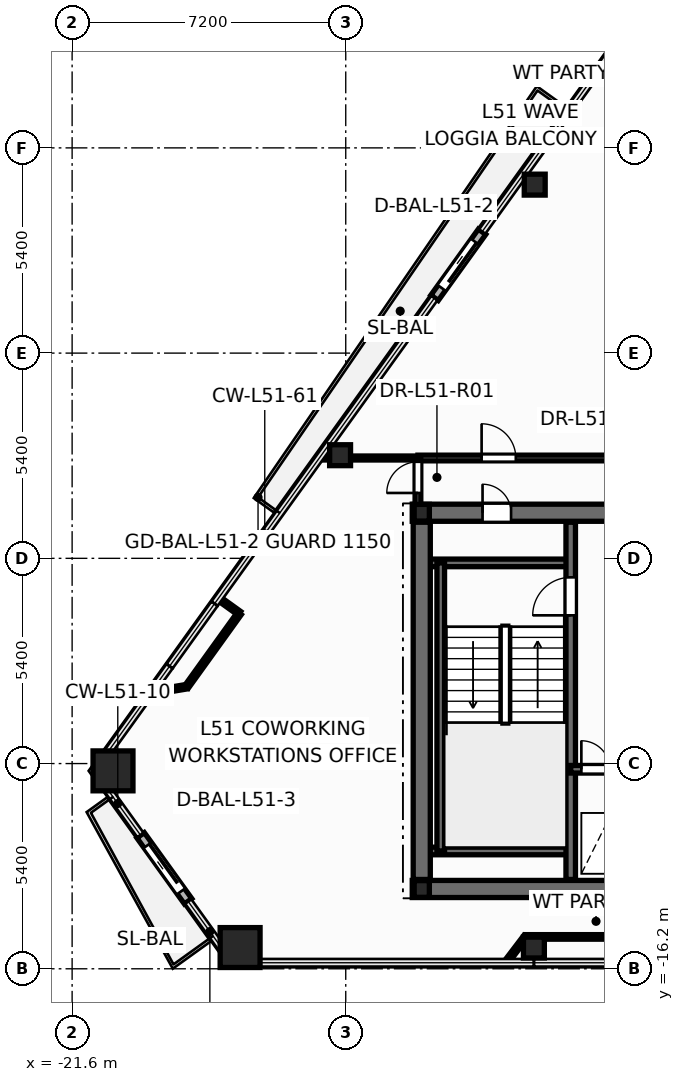
"""IFC4 building model, lengths in metres.
Left out: names, types, materials, properties, quantities, classifications, styles, units other than length and angle.
Written with IfcOpenShell. Run it as: python <this file> out.ifc"""

import sys

from ifc_helpers import new_model, si_unit, direction, frame, frame_2d, origin, origin_2d, place, context, subcontext, project, spatial, rectangle, hollow_rectangle, hollow_circle, i_section, extrude, element, fill, save


model = new_model("IFC4")
c1 = context("Model", 3, precision=1e-05, world=origin(), true_north=direction((0.0, 1.0)))
c2 = subcontext(c1, "Body", "Model", "MODEL_VIEW")
j1 = project(units=[si_unit("LENGTHUNIT", "METRE"), si_unit("PLANEANGLEUNIT", "RADIAN")], contexts=[c1])
p1 = place(None, origin())
s1 = spatial("IfcSite", under=j1, at=p1, CompositionType="ELEMENT")
p2 = place(p1, origin())
s2 = spatial("IfcBuilding", under=s1, at=p2, CompositionType="ELEMENT")
p3 = place(p2, frame((0.0, 0.0, 196.5)))
s3 = spatial("IfcBuildingStorey", under=s2, at=p3, CompositionType="ELEMENT", Elevation=196.5)
for number, where, z_axis, x_axis in (
    (1, (-20.524, -10.992, 0.0), (0.0, 0.0, 1.0), (1.0, 0.0, 0.0)),
    (2, (-17.18, -15.641, 0.0), (0.0, 0.0, 1.0), (1.0, 0.0, 0.0)),
):
    element("IfcColumn", number, at=place(p3, frame(where, z_axis=z_axis, x_axis=x_axis)), inside=s3, PredefinedType="COLUMN", context=c2, shape_type="SweptSolid", body=[
        extrude(hollow_rectangle(XDim=1.05, YDim=1.05, WallThickness=0.045, at=origin_2d()), origin(), (0.0, 0.0, 1.0), 3.6),
    ])
for number, where, z_axis, x_axis in (
    (3, (-9.449, -15.641, 0.0), (0.0, 0.0, 1.0), (1.0, 0.0, 0.0)),
    (4, (-9.427, 4.433, 0.0), (0.0, 0.0, 1.0), (1.0, 0.0, 0.0)),
    (5, (-14.549, -2.686, 0.0), (0.0, 0.0, 1.0), (1.0, 0.0, 0.0)),
):
    element("IfcColumn", number, at=place(p3, frame(where, z_axis=z_axis, x_axis=x_axis)), inside=s3, PredefinedType="COLUMN", context=c2, shape_type="SweptSolid", body=[
        extrude(hollow_circle(Radius=0.275, WallThickness=0.024, at=origin_2d()), origin(), (0.0, 0.0, 1.0), 3.6),
    ])
for number, where, z_axis, x_axis in (
    (6, (-12.4, -14.1, 0.0), (0.0, 0.0, 1.0), (1.0, 0.0, 0.0)),
    (7, (-12.4, -4.2, 0.0), (0.0, 0.0, 1.0), (1.0, 0.0, 0.0)),
):
    element("IfcColumn", number, at=place(p3, frame(where, z_axis=z_axis, x_axis=x_axis)), inside=s3, PredefinedType="COLUMN", context=c2, shape_type="SweptSolid", body=[
        extrude(i_section(OverallWidth=0.4, OverallDepth=0.44, WebThickness=0.028, FlangeThickness=0.04, at=origin_2d()), origin(), (0.0, 0.0, 1.0), 3.6),
    ])
p4 = place(p3, frame((-10.813, 3.192, -0.015), z_axis=(0.0, 0.0, 1.0), x_axis=(-0.583965085393, -0.811778774693, 0.0)))
e8 = element("IfcWall", 8, at=p4, inside=s3, PredefinedType="STANDARD", context=c2, shape_type="SweptSolid", body=[
    extrude(rectangle(XDim=2.14, YDim=0.24, at=frame_2d((1.07, 0.0))), origin(), (0.0, 0.0, 1.0), 2.807),
])
p5 = place(p4, frame((0.32, 0.0, 0.015)))
e9 = element("IfcOpeningElement", 9, at=p5, cuts=e8, PredefinedType="OPENING", context=c2, shape_type="SweptSolid", body=[
    extrude(rectangle(XDim=1.506, YDim=2.204, at=frame_2d((0.75, 1.102))), frame((0.0, 0.13, 0.0), z_axis=(0.0, -1.0, 0.0), x_axis=(1.0, 0.0, 0.0)), (0.0, 0.0, 1.0), 0.26),
])
p6 = place(p3, frame((-19.798, -12.686, -0.015), z_axis=(0.0, 0.0, 1.0), x_axis=(0.583965085393, -0.811778774693, 0.0)))
e10 = element("IfcWall", 10, at=p6, inside=s3, PredefinedType="STANDARD", context=c2, shape_type="SweptSolid", body=[
    extrude(rectangle(XDim=2.14, YDim=0.24, at=frame_2d((1.07, 0.0))), origin(), (0.0, 0.0, 1.0), 2.807),
])
p7 = place(p6, frame((0.32, 0.0, 0.015)))
e11 = element("IfcOpeningElement", 11, at=p7, cuts=e10, PredefinedType="OPENING", context=c2, shape_type="SweptSolid", body=[
    extrude(rectangle(XDim=1.506, YDim=2.204, at=frame_2d((0.75, 1.102))), frame((0.0, 0.13, 0.0), z_axis=(0.0, -1.0, 0.0), x_axis=(1.0, 0.0, 0.0)), (0.0, 0.0, 1.0), 0.26),
])
p8 = place(p3, frame((-12.65, -14.1, 0.0), z_axis=(0.0, 0.0, 1.0), x_axis=(1.0, 0.0, 0.0)))
e12 = element("IfcWall", 12, at=p8, inside=s3, PredefinedType="SHEAR", context=c2, shape_type="SweptSolid", body=[
    extrude(rectangle(XDim=25.3, YDim=0.45, at=frame_2d((12.65, 0.0))), origin(), (0.0, 0.0, 1.0), 3.6),
])
p9 = place(p3, frame((-12.65, -4.2, 0.0), z_axis=(0.0, 0.0, 1.0), x_axis=(1.0, 0.0, 0.0)))
e13 = element("IfcWall", 13, at=p9, inside=s3, PredefinedType="SHEAR", context=c2, shape_type="SweptSolid", body=[
    extrude(rectangle(XDim=25.3, YDim=0.45, at=frame_2d((12.65, 0.0))), origin(), (0.0, 0.0, 1.0), 3.6),
])
p10 = place(p9, frame((1.85, 0.0, 0.0)))
e14 = element("IfcOpeningElement", 14, at=p10, cuts=e13, PredefinedType="OPENING", context=c2, shape_type="SweptSolid", body=[
    extrude(rectangle(XDim=0.756, YDim=2.054, at=frame_2d((0.375, 1.027))), frame((0.0, 0.235, 0.0), z_axis=(0.0, -1.0, 0.0), x_axis=(1.0, 0.0, 0.0)), (0.0, 0.0, 1.0), 0.47),
])
p11 = place(p9, frame((22.65, 0.0, 0.0)))
e15 = element("IfcOpeningElement", 15, at=p11, cuts=e13, PredefinedType="OPENING", context=c2, shape_type="SweptSolid", body=[
    extrude(rectangle(XDim=0.756, YDim=2.054, at=frame_2d((0.375, 1.027))), frame((0.0, 0.235, 0.0), z_axis=(0.0, -1.0, 0.0), x_axis=(1.0, 0.0, 0.0)), (0.0, 0.0, 1.0), 0.47),
])
p12 = place(p9, frame((5.85, 0.0, 0.0)))
e16 = element("IfcOpeningElement", 16, at=p12, cuts=e13, PredefinedType="OPENING", context=c2, shape_type="SweptSolid", body=[
    extrude(rectangle(XDim=1.006, YDim=2.104, at=frame_2d((0.5, 1.052))), frame((0.0, 0.235, 0.0), z_axis=(0.0, -1.0, 0.0), x_axis=(1.0, 0.0, 0.0)), (0.0, 0.0, 1.0), 0.47),
])
p13 = place(p9, frame((10.35, 0.0, 0.0)))
e17 = element("IfcOpeningElement", 17, at=p13, cuts=e13, PredefinedType="OPENING", context=c2, shape_type="SweptSolid", body=[
    extrude(rectangle(XDim=1.406, YDim=2.154, at=frame_2d((0.7, 1.077))), frame((0.0, 0.235, 0.0), z_axis=(0.0, -1.0, 0.0), x_axis=(1.0, 0.0, 0.0)), (0.0, 0.0, 1.0), 0.47),
])
p14 = place(p9, frame((18.45, 0.0, 0.0)))
e18 = element("IfcOpeningElement", 18, at=p14, cuts=e13, PredefinedType="OPENING", context=c2, shape_type="SweptSolid", body=[
    extrude(rectangle(XDim=1.006, YDim=2.104, at=frame_2d((0.5, 1.052))), frame((0.0, 0.235, 0.0), z_axis=(0.0, -1.0, 0.0), x_axis=(1.0, 0.0, 0.0)), (0.0, 0.0, 1.0), 0.47),
])
for number, where, z_axis, x_axis in (
    (19, (-12.35, -5.52, 0.0), (0.0, 0.0, 1.0), (1.0, 0.0, 0.0)),
    (20, (-12.35, -13.1, 0.0), (0.0, 0.0, 1.0), (1.0, 0.0, 0.0)),
):
    element("IfcWall", number, at=place(p3, frame(where, z_axis=z_axis, x_axis=x_axis)), inside=s3, PredefinedType="SOLIDWALL", context=c2, shape_type="SweptSolid", body=[
        extrude(rectangle(XDim=3.87, YDim=0.2, at=frame_2d((1.935, 0.0))), origin(), (0.0, 0.0, 1.0), 3.6),
    ])
p15 = place(p3, frame((-11.9, -13.1, 0.0), z_axis=(0.0, 0.0, 1.0), x_axis=(0.0, 1.0, 0.0)))
e21 = element("IfcWall", 21, at=p15, inside=s3, PredefinedType="SOLIDWALL", context=c2, shape_type="SweptSolid", body=[
    extrude(rectangle(XDim=7.58, YDim=0.2, at=frame_2d((3.79, 0.0))), origin(), (0.0, 0.0, 1.0), 3.6),
])
p16 = place(p3, frame((-8.48, -13.85, 0.0), z_axis=(0.0, 0.0, 1.0), x_axis=(0.0, 1.0, 0.0)))
e22 = element("IfcWall", 22, at=p16, inside=s3, PredefinedType="SHEAR", context=c2, shape_type="SweptSolid", body=[
    extrude(rectangle(XDim=9.4, YDim=0.25, at=frame_2d((4.7, 0.0))), origin(), (0.0, 0.0, 1.0), 3.6),
])
p17 = place(p16, frame((6.95, 0.0, 0.0)))
e23 = element("IfcOpeningElement", 23, at=p17, cuts=e22, PredefinedType="OPENING", context=c2, shape_type="SweptSolid", body=[
    extrude(rectangle(XDim=1.006, YDim=2.104, at=frame_2d((0.5, 1.052))), frame((0.0, 0.135, 0.0), z_axis=(0.0, -1.0, 0.0), x_axis=(1.0, 0.0, 0.0)), (0.0, 0.0, 1.0), 0.27),
])
p18 = place(p3, frame((-8.48, -10.95, 0.0), z_axis=(0.0, 0.0, 1.0), x_axis=(1.0, 0.0, 0.0)))
e24 = element("IfcWall", 24, at=p18, inside=s3, PredefinedType="SOLIDWALL", context=c2, shape_type="SweptSolid", body=[
    extrude(rectangle(XDim=3.36, YDim=0.2, at=frame_2d((1.68, 0.0))), origin(), (0.0, 0.0, 1.0), 3.6),
])
p19 = place(p18, frame((0.28, 0.0, 0.0)))
e25 = element("IfcOpeningElement", 25, at=p19, cuts=e24, PredefinedType="OPENING", context=c2, shape_type="SweptSolid", body=[
    extrude(rectangle(XDim=0.756, YDim=2.054, at=frame_2d((0.375, 1.027))), frame((0.0, 0.11, 0.0), z_axis=(0.0, -1.0, 0.0), x_axis=(1.0, 0.0, 0.0)), (0.0, 0.0, 1.0), 0.22),
])
p20 = place(p18, frame((1.85, 0.0, 0.0)))
e26 = element("IfcOpeningElement", 26, at=p20, cuts=e24, PredefinedType="OPENING", context=c2, shape_type="SweptSolid", body=[
    extrude(rectangle(XDim=1.106, YDim=2.104, at=frame_2d((0.55, 1.052))), frame((0.0, 0.11, 0.0), z_axis=(0.0, -1.0, 0.0), x_axis=(1.0, 0.0, 0.0)), (0.0, 0.0, 1.0), 0.22),
])
p21 = place(p3, frame((-12.4, -13.85, 0.0), z_axis=(0.0, 0.0, 1.0), x_axis=(0.0, 1.0, 0.0)))
e27 = element("IfcWall", 27, at=p21, inside=s3, PredefinedType="SHEAR", context=c2, shape_type="SweptSolid", body=[
    extrude(rectangle(XDim=9.4, YDim=0.45, at=frame_2d((4.7, 0.0))), origin(), (0.0, 0.0, 1.0), 3.6),
])
p22 = place(p3, frame((-12.5, -2.76, 0.0), z_axis=(0.0, 0.0, 1.0), x_axis=(1.0, 0.0, 0.0)))
e28 = element("IfcWall", 28, at=p22, inside=s3, PredefinedType="PARTITIONING", context=c2, shape_type="SweptSolid", body=[
    extrude(rectangle(XDim=7.76, YDim=0.15, at=frame_2d((3.88, 0.0))), origin(), (0.0, 0.0, 1.0), 2.325),
])
p23 = place(p22, frame((1.675, 0.0, 0.0)))
e29 = element("IfcOpeningElement", 29, at=p23, cuts=e28, PredefinedType="OPENING", context=c2, shape_type="SweptSolid", body=[
    extrude(rectangle(XDim=0.906, YDim=2.104, at=frame_2d((0.45, 1.052))), frame((0.0, 0.085, 0.0), z_axis=(0.0, -1.0, 0.0), x_axis=(1.0, 0.0, 0.0)), (0.0, 0.0, 1.0), 0.17),
])
p24 = place(p3, frame((-9.669, -15.361, 0.0), z_axis=(0.0, 0.0, 1.0), x_axis=(1.0, 0.0, 0.0)))
e30 = element("IfcWall", 30, at=p24, inside=s3, PredefinedType="PARTITIONING", context=c2, shape_type="SweptSolid", body=[
    extrude(rectangle(XDim=3.711, YDim=0.12, at=frame_2d((1.855, 0.0))), origin(), (0.0, 0.0, 1.0), 2.792),
])
p25 = place(p3, frame((-15.095, -2.76, 0.0), z_axis=(0.0, 0.0, 1.0), x_axis=(1.0, 0.0, 0.0)))
e31 = element("IfcWall", 31, at=p25, inside=s3, PredefinedType="PARTITIONING", context=c2, shape_type="SweptSolid", body=[
    extrude(rectangle(XDim=2.595, YDim=0.105, at=frame_2d((1.297, 0.0))), origin(), (0.0, 0.0, 1.0), 2.625),
])
p26 = place(p3, frame((-17.198, -6.847, 0.0), z_axis=(0.0, 0.0, 1.0), x_axis=(-0.583963896956, -0.811779629611, 0.0)))
e32 = element("IfcWall", 32, at=p26, inside=s3, PredefinedType="PARTITIONING", context=c2, shape_type="SweptSolid", body=[
    extrude(rectangle(XDim=2.378, YDim=0.12, at=frame_2d((1.189, 0.0))), origin(), (0.0, 0.0, 1.0), 3.35),
])
p27 = place(p3, frame((-12.5, -4.24, 0.0), z_axis=(0.0, 0.0, 1.0), x_axis=(0.0, 1.0, 0.0)))
e33 = element("IfcWall", 33, at=p27, inside=s3, PredefinedType="PARTITIONING", context=c2, shape_type="SweptSolid", body=[
    extrude(rectangle(XDim=1.48, YDim=0.15, at=frame_2d((0.74, 0.0))), origin(), (0.0, 0.0, 1.0), 2.325),
])
p28 = place(p27, frame((0.56, 0.0, 0.0)))
e34 = element("IfcOpeningElement", 34, at=p28, cuts=e33, PredefinedType="OPENING", context=c2, shape_type="SweptSolid", body=[
    extrude(rectangle(XDim=0.826, YDim=2.104, at=frame_2d((0.41, 1.052))), frame((0.0, 0.085, 0.0), z_axis=(0.0, -1.0, 0.0), x_axis=(1.0, 0.0, 0.0)), (0.0, 0.0, 1.0), 0.17),
])
p29 = place(p3, frame((-18.586, -8.778, 0.0), z_axis=(0.0, 0.0, 1.0), x_axis=(-0.98640168839, -0.164352393172, 0.0)))
e35 = element("IfcWall", 35, at=p29, inside=s3, PredefinedType="PARTITIONING", context=c2, shape_type="SweptSolid", body=[
    extrude(rectangle(XDim=0.85, YDim=0.12, at=frame_2d((0.425, 0.0))), origin(), (0.0, 0.0, 1.0), 2.792),
])
p30 = place(p3, frame((-10.179, -16.031, 0.0), z_axis=(0.0, 0.0, 1.0), x_axis=(0.605553776309, 0.795804388023, 0.0)))
e36 = element("IfcWall", 36, at=p30, inside=s3, PredefinedType="PARTITIONING", context=c2, shape_type="SweptSolid", body=[
    extrude(rectangle(XDim=0.842, YDim=0.12, at=frame_2d((0.421, 0.0))), origin(), (0.0, 0.0, 1.0), 2.792),
])
p31 = place(p3, frame((-17.741, -6.456, 0.0), z_axis=(0.0, 0.0, 1.0), x_axis=(0.811783169955, -0.583958975423, 0.0)))
e37 = element("IfcWall", 37, at=p31, inside=s3, PredefinedType="PARTITIONING", context=c2, shape_type="SweptSolid", body=[
    extrude(rectangle(XDim=0.67, YDim=0.12, at=frame_2d((0.335, 0.0))), origin(), (0.0, 0.0, 1.0), 2.792),
])
p32 = place(p5, origin())
e38 = element("IfcDoor", 38, at=p32, inside=s3, OperationType="SLIDING_TO_RIGHT", PredefinedType="DOOR", context=c2, shape_type="SweptSolid", body=[
    extrude(rectangle(XDim=1.5, YDim=2.2, at=frame_2d((0.75, 1.1))), frame((0.0, 0.025, 0.0), z_axis=(0.0, -1.0, 0.0), x_axis=(1.0, 0.0, 0.0)), (0.0, 0.0, 1.0), 0.05),
])
fill(e9, e38)
p33 = place(p7, origin())
e39 = element("IfcDoor", 39, at=p33, inside=s3, OperationType="SLIDING_TO_RIGHT", PredefinedType="DOOR", context=c2, shape_type="SweptSolid", body=[
    extrude(rectangle(XDim=1.5, YDim=2.2, at=frame_2d((0.75, 1.1))), frame((0.0, 0.025, 0.0), z_axis=(0.0, -1.0, 0.0), x_axis=(1.0, 0.0, 0.0)), (0.0, 0.0, 1.0), 0.05),
])
fill(e11, e39)
p34 = place(p17, origin())
e40 = element("IfcDoor", 40, at=p34, inside=s3, OperationType="SINGLE_SWING_LEFT", PredefinedType="DOOR", context=c2, shape_type="SweptSolid", body=[
    extrude(rectangle(XDim=1.0, YDim=2.1, at=frame_2d((0.5, 1.05))), frame((0.0, 0.025, 0.0), z_axis=(0.0, -1.0, 0.0), x_axis=(1.0, 0.0, 0.0)), (0.0, 0.0, 1.0), 0.05),
])
fill(e23, e40)
p35 = place(p19, origin())
e41 = element("IfcDoor", 41, at=p35, inside=s3, OperationType="SINGLE_SWING_LEFT", PredefinedType="DOOR", context=c2, shape_type="SweptSolid", body=[
    extrude(rectangle(XDim=0.75, YDim=2.05, at=frame_2d((0.375, 1.025))), frame((0.0, 0.025, 0.0), z_axis=(0.0, -1.0, 0.0), x_axis=(1.0, 0.0, 0.0)), (0.0, 0.0, 1.0), 0.05),
])
fill(e25, e41)
p36 = place(p10, origin())
e42 = element("IfcDoor", 42, at=p36, inside=s3, OperationType="SINGLE_SWING_LEFT", PredefinedType="DOOR", context=c2, shape_type="SweptSolid", body=[
    extrude(rectangle(XDim=0.75, YDim=2.05, at=frame_2d((0.375, 1.025))), frame((0.0, 0.025, 0.0), z_axis=(0.0, -1.0, 0.0), x_axis=(1.0, 0.0, 0.0)), (0.0, 0.0, 1.0), 0.05),
])
fill(e14, e42)
p37 = place(p28, origin())
e43 = element("IfcDoor", 43, at=p37, inside=s3, OperationType="SINGLE_SWING_LEFT", PredefinedType="DOOR", context=c2, shape_type="SweptSolid", body=[
    extrude(rectangle(XDim=0.82, YDim=2.1, at=frame_2d((0.41, 1.05))), frame((0.0, 0.025, 0.0), z_axis=(0.0, -1.0, 0.0), x_axis=(1.0, 0.0, 0.0)), (0.0, 0.0, 1.0), 0.05),
])
fill(e34, e43)
p38 = place(p23, origin())
e44 = element("IfcDoor", 44, at=p38, inside=s3, OperationType="SINGLE_SWING_LEFT", PredefinedType="DOOR", context=c2, shape_type="SweptSolid", body=[
    extrude(rectangle(XDim=0.9, YDim=2.1, at=frame_2d((0.45, 1.05))), frame((0.0, 0.025, 0.0), z_axis=(0.0, -1.0, 0.0), x_axis=(1.0, 0.0, 0.0)), (0.0, 0.0, 1.0), 0.05),
])
fill(e29, e44)
save(model, sys.argv[1])
